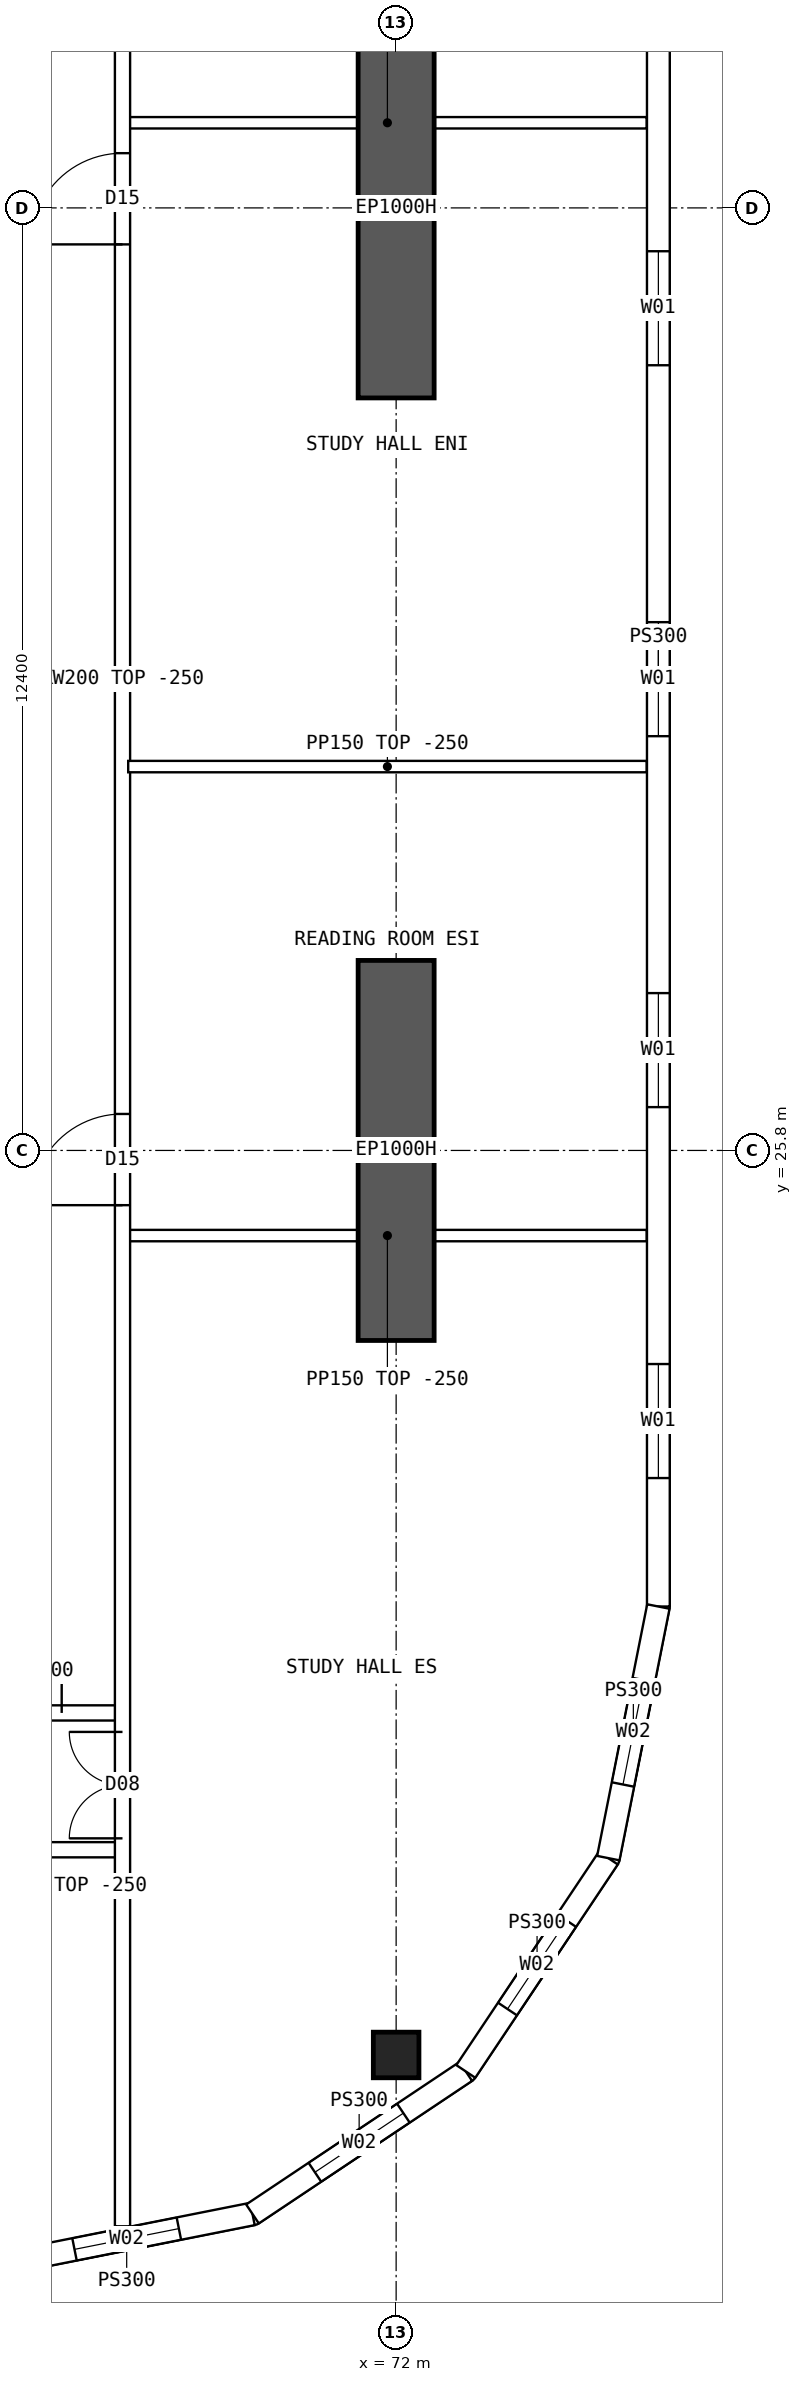
"""IFC4 building model, lengths in metres.
Left out: names, types, materials, properties, quantities, classifications, styles, units other than length and angle.
Written with IfcOpenShell. Run it as: python <this file> out.ifc"""

import sys

from ifc_helpers import new_model, si_unit, direction, frame, frame_2d, origin, origin_2d, place, context, subcontext, project, spatial, polyline, rectangle, hollow_rectangle, outline, extrude, element, fill, save


model = new_model("IFC4")
c1 = context("Model", 3, precision=1e-05, world=origin(), true_north=direction((0.0, 1.0)))
c2 = subcontext(c1, "Body", "Model", "MODEL_VIEW")
j1 = project(units=[si_unit("LENGTHUNIT", "METRE"), si_unit("PLANEANGLEUNIT", "RADIAN")], contexts=[c1])
p1 = place(None, origin())
s1 = spatial("IfcSite", under=j1, at=p1, CompositionType="ELEMENT")
p2 = place(p1, origin())
s2 = spatial("IfcBuilding", under=s1, at=p2, CompositionType="ELEMENT")
p3 = place(p2, frame((0.0, 0.0, 220.3)))
s3 = spatial("IfcBuildingStorey", under=s2, at=p3, CompositionType="ELEMENT", Elevation=220.3)
p4 = place(p3, frame((72.0, 13.9, 0.0), z_axis=(0.0, 0.0, 1.0), x_axis=(1.0, 0.0, 0.0)))
e1 = element("IfcColumn", 1, at=p4, inside=s3, PredefinedType="COLUMN", context=c2, shape_type="SweptSolid", body=[
    extrude(hollow_rectangle(XDim=0.6, YDim=0.6, WallThickness=0.06, at=origin_2d()), origin(), (0.0, 0.0, 1.0), 3.75),
])
for number, where, z_axis, x_axis in (
    (2, (72.0, 23.3, 0.0), (0.0, 0.0, 1.0), (0.0, 1.0, 0.0)),
    (3, (72.0, 35.7, 0.0), (0.0, 0.0, 1.0), (0.0, 1.0, 0.0)),
):
    element("IfcWall", number, at=place(p3, frame(where, z_axis=z_axis, x_axis=x_axis)), inside=s3, PredefinedType="SHEAR", context=c2, shape_type="SweptSolid", body=[
        extrude(rectangle(XDim=5.0, YDim=1.0, at=frame_2d((2.5, 0.0))), origin(), (0.0, 0.0, 1.0), 3.75),
    ])
p5 = place(p3, frame((75.45, 19.8, 0.0), z_axis=(0.0, 0.0, 1.0), x_axis=(0.0, 1.0, 0.0)))
e4 = element("IfcWall", 4, at=p5, inside=s3, PredefinedType="SOLIDWALL", context=c2, shape_type="SweptSolid", body=[
    extrude(outline(polyline([(-0.015, -0.15), (24.415, -0.15), (24.385, 0.15), (0.015, 0.15), (-0.015, -0.15)])), origin(), (0.0, 0.0, 1.0), 3.5),
])
p6 = place(p5, frame((1.69, 0.0, 0.9)))
e5 = element("IfcOpeningElement", 5, at=p6, cuts=e4, PredefinedType="OPENING", context=c2, shape_type="SweptSolid", body=[
    extrude(rectangle(XDim=1.5, YDim=2.0, at=frame_2d((0.75, 1.0))), frame((0.0, 0.16, 0.0), z_axis=(0.0, -1.0, 0.0), x_axis=(1.0, 0.0, 0.0)), (0.0, 0.0, 1.0), 0.32),
])
p7 = place(p5, frame((6.57, 0.0, 0.9)))
e6 = element("IfcOpeningElement", 6, at=p7, cuts=e4, PredefinedType="OPENING", context=c2, shape_type="SweptSolid", body=[
    extrude(rectangle(XDim=1.5, YDim=2.0, at=frame_2d((0.75, 1.0))), frame((0.0, 0.16, 0.0), z_axis=(0.0, -1.0, 0.0), x_axis=(1.0, 0.0, 0.0)), (0.0, 0.0, 1.0), 0.32),
])
p8 = place(p5, frame((11.45, 0.0, 0.9)))
e7 = element("IfcOpeningElement", 7, at=p8, cuts=e4, PredefinedType="OPENING", context=c2, shape_type="SweptSolid", body=[
    extrude(rectangle(XDim=1.5, YDim=2.0, at=frame_2d((0.75, 1.0))), frame((0.0, 0.16, 0.0), z_axis=(0.0, -1.0, 0.0), x_axis=(1.0, 0.0, 0.0)), (0.0, 0.0, 1.0), 0.32),
])
p9 = place(p5, frame((16.33, 0.0, 0.9)))
e8 = element("IfcOpeningElement", 8, at=p9, cuts=e4, PredefinedType="OPENING", context=c2, shape_type="SweptSolid", body=[
    extrude(rectangle(XDim=1.5, YDim=2.0, at=frame_2d((0.75, 1.0))), frame((0.0, 0.16, 0.0), z_axis=(0.0, -1.0, 0.0), x_axis=(1.0, 0.0, 0.0)), (0.0, 0.0, 1.0), 0.32),
])
p10 = place(p5, frame((21.21, 0.0, 0.9)))
e9 = element("IfcOpeningElement", 9, at=p10, cuts=e4, PredefinedType="OPENING", context=c2, shape_type="SweptSolid", body=[
    extrude(rectangle(XDim=1.5, YDim=2.0, at=frame_2d((0.75, 1.0))), frame((0.0, 0.16, 0.0), z_axis=(0.0, -1.0, 0.0), x_axis=(1.0, 0.0, 0.0)), (0.0, 0.0, 1.0), 0.32),
])
p11 = place(p3, frame((66.8, 11.15, 0.0), z_axis=(0.0, 0.0, 1.0), x_axis=(0.98078325777, 0.195100490205, 0.0)))
e10 = element("IfcWall", 10, at=p11, inside=s3, PredefinedType="SOLIDWALL", context=c2, shape_type="SweptSolid", body=[
    extrude(outline(polyline([(-0.03, -0.15), (3.405, -0.15), (3.345, 0.15), (0.03, 0.15), (-0.03, -0.15)])), origin(), (0.0, 0.0, 1.0), 3.5),
])
p12 = place(p11, frame((0.988, 0.0, 0.9)))
e11 = element("IfcOpeningElement", 11, at=p12, cuts=e10, PredefinedType="OPENING", context=c2, shape_type="SweptSolid", body=[
    extrude(rectangle(XDim=1.4, YDim=1.8, at=frame_2d((0.7, 0.9))), frame((0.0, 0.16, 0.0), z_axis=(0.0, -1.0, 0.0), x_axis=(1.0, 0.0, 0.0)), (0.0, 0.0, 1.0), 0.32),
])
p13 = place(p3, frame((70.11, 11.808, 0.0), z_axis=(0.0, 0.0, 1.0), x_axis=(0.831460037396, 0.555584562613, 0.0)))
e12 = element("IfcWall", 12, at=p13, inside=s3, PredefinedType="SOLIDWALL", context=c2, shape_type="SweptSolid", body=[
    extrude(outline(polyline([(-0.03, -0.15), (3.405, -0.15), (3.345, 0.15), (0.03, 0.15), (-0.03, -0.15)])), origin(), (0.0, 0.0, 1.0), 3.5),
])
p14 = place(p13, frame((0.988, 0.0, 0.9)))
e13 = element("IfcOpeningElement", 13, at=p14, cuts=e12, PredefinedType="OPENING", context=c2, shape_type="SweptSolid", body=[
    extrude(rectangle(XDim=1.4, YDim=1.8, at=frame_2d((0.7, 0.9))), frame((0.0, 0.16, 0.0), z_axis=(0.0, -1.0, 0.0), x_axis=(1.0, 0.0, 0.0)), (0.0, 0.0, 1.0), 0.32),
])
p15 = place(p3, frame((72.917, 13.684, 0.0), z_axis=(0.0, 0.0, 1.0), x_axis=(0.555567969291, 0.831471124873, 0.0)))
e14 = element("IfcWall", 14, at=p15, inside=s3, PredefinedType="SOLIDWALL", context=c2, shape_type="SweptSolid", body=[
    extrude(outline(polyline([(-0.03, -0.15), (3.405, -0.15), (3.345, 0.15), (0.03, 0.15), (-0.03, -0.15)])), origin(), (0.0, 0.0, 1.0), 3.5),
])
p16 = place(p15, frame((0.988, 0.0, 0.9)))
e15 = element("IfcOpeningElement", 15, at=p16, cuts=e14, PredefinedType="OPENING", context=c2, shape_type="SweptSolid", body=[
    extrude(rectangle(XDim=1.4, YDim=1.8, at=frame_2d((0.7, 0.9))), frame((0.0, 0.16, 0.0), z_axis=(0.0, -1.0, 0.0), x_axis=(1.0, 0.0, 0.0)), (0.0, 0.0, 1.0), 0.32),
])
p17 = place(p3, frame((74.792, 16.49, 0.0), z_axis=(0.0, 0.0, 1.0), x_axis=(0.19508664885, 0.980786011034, 0.0)))
e16 = element("IfcWall", 16, at=p17, inside=s3, PredefinedType="SOLIDWALL", context=c2, shape_type="SweptSolid", body=[
    extrude(outline(polyline([(-0.03, -0.15), (3.39, -0.15), (3.36, 0.15), (0.03, 0.15), (-0.03, -0.15)])), origin(), (0.0, 0.0, 1.0), 3.5),
])
p18 = place(p17, frame((0.988, 0.0, 0.9)))
e17 = element("IfcOpeningElement", 17, at=p18, cuts=e16, PredefinedType="OPENING", context=c2, shape_type="SweptSolid", body=[
    extrude(rectangle(XDim=1.4, YDim=1.8, at=frame_2d((0.7, 0.9))), frame((0.0, 0.16, 0.0), z_axis=(0.0, -1.0, 0.0), x_axis=(1.0, 0.0, 0.0)), (0.0, 0.0, 1.0), 0.32),
])
p19 = place(p3, frame((66.35, 16.6, 0.0), z_axis=(0.0, 0.0, 1.0), x_axis=(1.0, 0.0, 0.0)))
e18 = element("IfcWall", 18, at=p19, inside=s3, PredefinedType="SOLIDWALL", context=c2, shape_type="SweptSolid", body=[
    extrude(rectangle(XDim=2.05, YDim=0.2, at=frame_2d((1.025, 0.0))), origin(), (0.0, 0.0, 1.0), 3.5),
])
p20 = place(p19, frame((0.2, 0.0, 0.0)))
e19 = element("IfcOpeningElement", 19, at=p20, cuts=e18, PredefinedType="OPENING", context=c2, shape_type="SweptSolid", body=[
    extrude(rectangle(XDim=0.9, YDim=2.1, at=frame_2d((0.45, 1.05))), frame((0.0, 0.11, 0.0), z_axis=(0.0, -1.0, 0.0), x_axis=(1.0, 0.0, 0.0)), (0.0, 0.0, 1.0), 0.22),
])
p21 = place(p3, frame((66.35, 18.4, 0.0), z_axis=(0.0, 0.0, 1.0), x_axis=(1.0, 0.0, 0.0)))
e20 = element("IfcWall", 20, at=p21, inside=s3, PredefinedType="SOLIDWALL", context=c2, shape_type="SweptSolid", body=[
    extrude(rectangle(XDim=2.05, YDim=0.2, at=frame_2d((1.025, 0.0))), origin(), (0.0, 0.0, 1.0), 3.5),
])
p22 = place(p21, frame((0.05, 0.0, 0.0)))
e21 = element("IfcOpeningElement", 21, at=p22, cuts=e20, PredefinedType="OPENING", context=c2, shape_type="SweptSolid", body=[
    extrude(rectangle(XDim=1.2, YDim=2.1, at=frame_2d((0.6, 1.05))), frame((0.0, 0.11, 0.0), z_axis=(0.0, -1.0, 0.0), x_axis=(1.0, 0.0, 0.0)), (0.0, 0.0, 1.0), 0.22),
])
p23 = place(p3, frame((68.475, 30.85, 0.0), z_axis=(0.0, 0.0, 1.0), x_axis=(1.0, 0.0, 0.0)))
e22 = element("IfcWall", 22, at=p23, inside=s3, PredefinedType="PARTITIONING", context=c2, shape_type="SweptSolid", body=[
    extrude(outline(polyline([(0.0, 0.0), (6.82, 0.0), (6.82, 3.5), (3.827, 3.5), (3.825, 3.05), (3.227, 3.05), (3.225, 3.5), (0.0, 3.5), (0.0, 0.0)])), frame((0.0, 0.075, 0.0), z_axis=(0.0, -1.0, 0.0), x_axis=(1.0, 0.0, 0.0)), (0.0, 0.0, 1.0), 0.15),
])
p24 = place(p3, frame((68.4, 11.646, 0.0), z_axis=(0.0, 0.0, 1.0), x_axis=(0.0, 1.0, 0.0)))
e23 = element("IfcWall", 23, at=p24, inside=s3, PredefinedType="SOLIDWALL", context=c2, shape_type="SweptSolid", body=[
    extrude(rectangle(XDim=40.708, YDim=0.2, at=frame_2d((20.354, 0.0))), origin(), (0.0, 0.0, 1.0), 3.5),
])
p25 = place(p24, frame((13.434, 0.0, 0.0)))
e24 = element("IfcOpeningElement", 24, at=p25, cuts=e23, PredefinedType="OPENING", context=c2, shape_type="SweptSolid", body=[
    extrude(rectangle(XDim=1.2, YDim=2.1, at=frame_2d((0.6, 1.05))), frame((0.0, 0.11, 0.0), z_axis=(0.0, -1.0, 0.0), x_axis=(1.0, 0.0, 0.0)), (0.0, 0.0, 1.0), 0.22),
])
p26 = place(p24, frame((26.074, 0.0, 0.0)))
e25 = element("IfcOpeningElement", 25, at=p26, cuts=e23, PredefinedType="OPENING", context=c2, shape_type="SweptSolid", body=[
    extrude(rectangle(XDim=1.2, YDim=2.1, at=frame_2d((0.6, 1.05))), frame((0.0, 0.11, 0.0), z_axis=(0.0, -1.0, 0.0), x_axis=(1.0, 0.0, 0.0)), (0.0, 0.0, 1.0), 0.22),
])
p27 = place(p24, frame((5.104, 0.0, 0.0)))
e26 = element("IfcOpeningElement", 26, at=p27, cuts=e23, PredefinedType="OPENING", context=c2, shape_type="SweptSolid", body=[
    extrude(rectangle(XDim=1.4, YDim=2.1, at=frame_2d((0.7, 1.05))), frame((0.0, 0.11, 0.0), z_axis=(0.0, -1.0, 0.0), x_axis=(1.0, 0.0, 0.0)), (0.0, 0.0, 1.0), 0.22),
])
p28 = place(p24, frame((34.104, 0.0, 0.0)))
e27 = element("IfcOpeningElement", 27, at=p28, cuts=e23, PredefinedType="OPENING", context=c2, shape_type="SweptSolid", body=[
    extrude(rectangle(XDim=1.4, YDim=2.1, at=frame_2d((0.7, 1.05))), frame((0.0, 0.11, 0.0), z_axis=(0.0, -1.0, 0.0), x_axis=(1.0, 0.0, 0.0)), (0.0, 0.0, 1.0), 0.22),
])
for number, where, z_axis, x_axis in (
    (28, (68.475, 24.68, 0.0), (0.0, 0.0, 1.0), (1.0, 0.0, 0.0)),
    (29, (68.475, 39.32, 0.0), (0.0, 0.0, 1.0), (1.0, 0.0, 0.0)),
):
    element("IfcWall", number, at=place(p3, frame(where, z_axis=z_axis, x_axis=x_axis)), inside=s3, PredefinedType="PARTITIONING", context=c2, shape_type="SweptSolid", body=[
        extrude(rectangle(XDim=6.82, YDim=0.15, at=frame_2d((3.41, 0.0))), origin(), (0.0, 0.0, 1.0), 3.5),
    ])
p29 = place(p6, origin())
e30 = element("IfcWindow", 30, at=p29, inside=s3, PartitioningType="SINGLE_PANEL", PredefinedType="WINDOW", context=c2, shape_type="SweptSolid", body=[
    extrude(rectangle(XDim=1.5, YDim=2.0, at=frame_2d((0.75, 1.0))), frame((0.0, 0.03, 0.0), z_axis=(0.0, -1.0, 0.0), x_axis=(1.0, 0.0, 0.0)), (0.0, 0.0, 1.0), 0.06),
])
fill(e5, e30)
p30 = place(p7, origin())
e31 = element("IfcWindow", 31, at=p30, inside=s3, PartitioningType="SINGLE_PANEL", PredefinedType="WINDOW", context=c2, shape_type="SweptSolid", body=[
    extrude(rectangle(XDim=1.5, YDim=2.0, at=frame_2d((0.75, 1.0))), frame((0.0, 0.03, 0.0), z_axis=(0.0, -1.0, 0.0), x_axis=(1.0, 0.0, 0.0)), (0.0, 0.0, 1.0), 0.06),
])
fill(e6, e31)
p31 = place(p8, origin())
e32 = element("IfcWindow", 32, at=p31, inside=s3, PartitioningType="SINGLE_PANEL", PredefinedType="WINDOW", context=c2, shape_type="SweptSolid", body=[
    extrude(rectangle(XDim=1.5, YDim=2.0, at=frame_2d((0.75, 1.0))), frame((0.0, 0.03, 0.0), z_axis=(0.0, -1.0, 0.0), x_axis=(1.0, 0.0, 0.0)), (0.0, 0.0, 1.0), 0.06),
])
fill(e7, e32)
p32 = place(p9, origin())
e33 = element("IfcWindow", 33, at=p32, inside=s3, PartitioningType="SINGLE_PANEL", PredefinedType="WINDOW", context=c2, shape_type="SweptSolid", body=[
    extrude(rectangle(XDim=1.5, YDim=2.0, at=frame_2d((0.75, 1.0))), frame((0.0, 0.03, 0.0), z_axis=(0.0, -1.0, 0.0), x_axis=(1.0, 0.0, 0.0)), (0.0, 0.0, 1.0), 0.06),
])
fill(e8, e33)
p33 = place(p12, origin())
e34 = element("IfcWindow", 34, at=p33, inside=s3, PartitioningType="SINGLE_PANEL", PredefinedType="WINDOW", context=c2, shape_type="SweptSolid", body=[
    extrude(rectangle(XDim=1.4, YDim=1.8, at=frame_2d((0.7, 0.9))), frame((0.0, 0.03, 0.0), z_axis=(0.0, -1.0, 0.0), x_axis=(1.0, 0.0, 0.0)), (0.0, 0.0, 1.0), 0.06),
])
fill(e11, e34)
p34 = place(p14, origin())
e35 = element("IfcWindow", 35, at=p34, inside=s3, PartitioningType="SINGLE_PANEL", PredefinedType="WINDOW", context=c2, shape_type="SweptSolid", body=[
    extrude(rectangle(XDim=1.4, YDim=1.8, at=frame_2d((0.7, 0.9))), frame((0.0, 0.03, 0.0), z_axis=(0.0, -1.0, 0.0), x_axis=(1.0, 0.0, 0.0)), (0.0, 0.0, 1.0), 0.06),
])
fill(e13, e35)
p35 = place(p16, origin())
e36 = element("IfcWindow", 36, at=p35, inside=s3, PartitioningType="SINGLE_PANEL", PredefinedType="WINDOW", context=c2, shape_type="SweptSolid", body=[
    extrude(rectangle(XDim=1.4, YDim=1.8, at=frame_2d((0.7, 0.9))), frame((0.0, 0.03, 0.0), z_axis=(0.0, -1.0, 0.0), x_axis=(1.0, 0.0, 0.0)), (0.0, 0.0, 1.0), 0.06),
])
fill(e15, e36)
p36 = place(p18, origin())
e37 = element("IfcWindow", 37, at=p36, inside=s3, PartitioningType="SINGLE_PANEL", PredefinedType="WINDOW", context=c2, shape_type="SweptSolid", body=[
    extrude(rectangle(XDim=1.4, YDim=1.8, at=frame_2d((0.7, 0.9))), frame((0.0, 0.03, 0.0), z_axis=(0.0, -1.0, 0.0), x_axis=(1.0, 0.0, 0.0)), (0.0, 0.0, 1.0), 0.06),
])
fill(e17, e37)
p37 = place(p22, origin())
e38 = element("IfcDoor", 38, at=p37, inside=s3, OperationType="DOUBLE_DOOR_SINGLE_SWING", PredefinedType="DOOR", context=c2, shape_type="SweptSolid", body=[
    extrude(rectangle(XDim=1.2, YDim=2.1, at=frame_2d((0.6, 1.05))), frame((0.0, 0.025, 0.0), z_axis=(0.0, -1.0, 0.0), x_axis=(1.0, 0.0, 0.0)), (0.0, 0.0, 1.0), 0.05),
])
fill(e21, e38)
p38 = place(p25, origin())
e39 = element("IfcDoor", 39, at=p38, inside=s3, OperationType="SINGLE_SWING_LEFT", PredefinedType="DOOR", context=c2, shape_type="SweptSolid", body=[
    extrude(rectangle(XDim=1.2, YDim=2.1, at=frame_2d((0.6, 1.05))), frame((0.0, 0.025, 0.0), z_axis=(0.0, -1.0, 0.0), x_axis=(1.0, 0.0, 0.0)), (0.0, 0.0, 1.0), 0.05),
])
fill(e24, e39)
p39 = place(p26, origin())
e40 = element("IfcDoor", 40, at=p39, inside=s3, OperationType="SINGLE_SWING_LEFT", PredefinedType="DOOR", context=c2, shape_type="SweptSolid", body=[
    extrude(rectangle(XDim=1.2, YDim=2.1, at=frame_2d((0.6, 1.05))), frame((0.0, 0.025, 0.0), z_axis=(0.0, -1.0, 0.0), x_axis=(1.0, 0.0, 0.0)), (0.0, 0.0, 1.0), 0.05),
])
fill(e25, e40)
p40 = place(p27, origin())
e41 = element("IfcDoor", 41, at=p40, inside=s3, OperationType="DOUBLE_DOOR_SINGLE_SWING", PredefinedType="DOOR", context=c2, shape_type="SweptSolid", body=[
    extrude(rectangle(XDim=1.4, YDim=2.1, at=frame_2d((0.7, 1.05))), frame((0.0, 0.025, 0.0), z_axis=(0.0, -1.0, 0.0), x_axis=(1.0, 0.0, 0.0)), (0.0, 0.0, 1.0), 0.05),
])
fill(e26, e41)
save(model, sys.argv[1])
